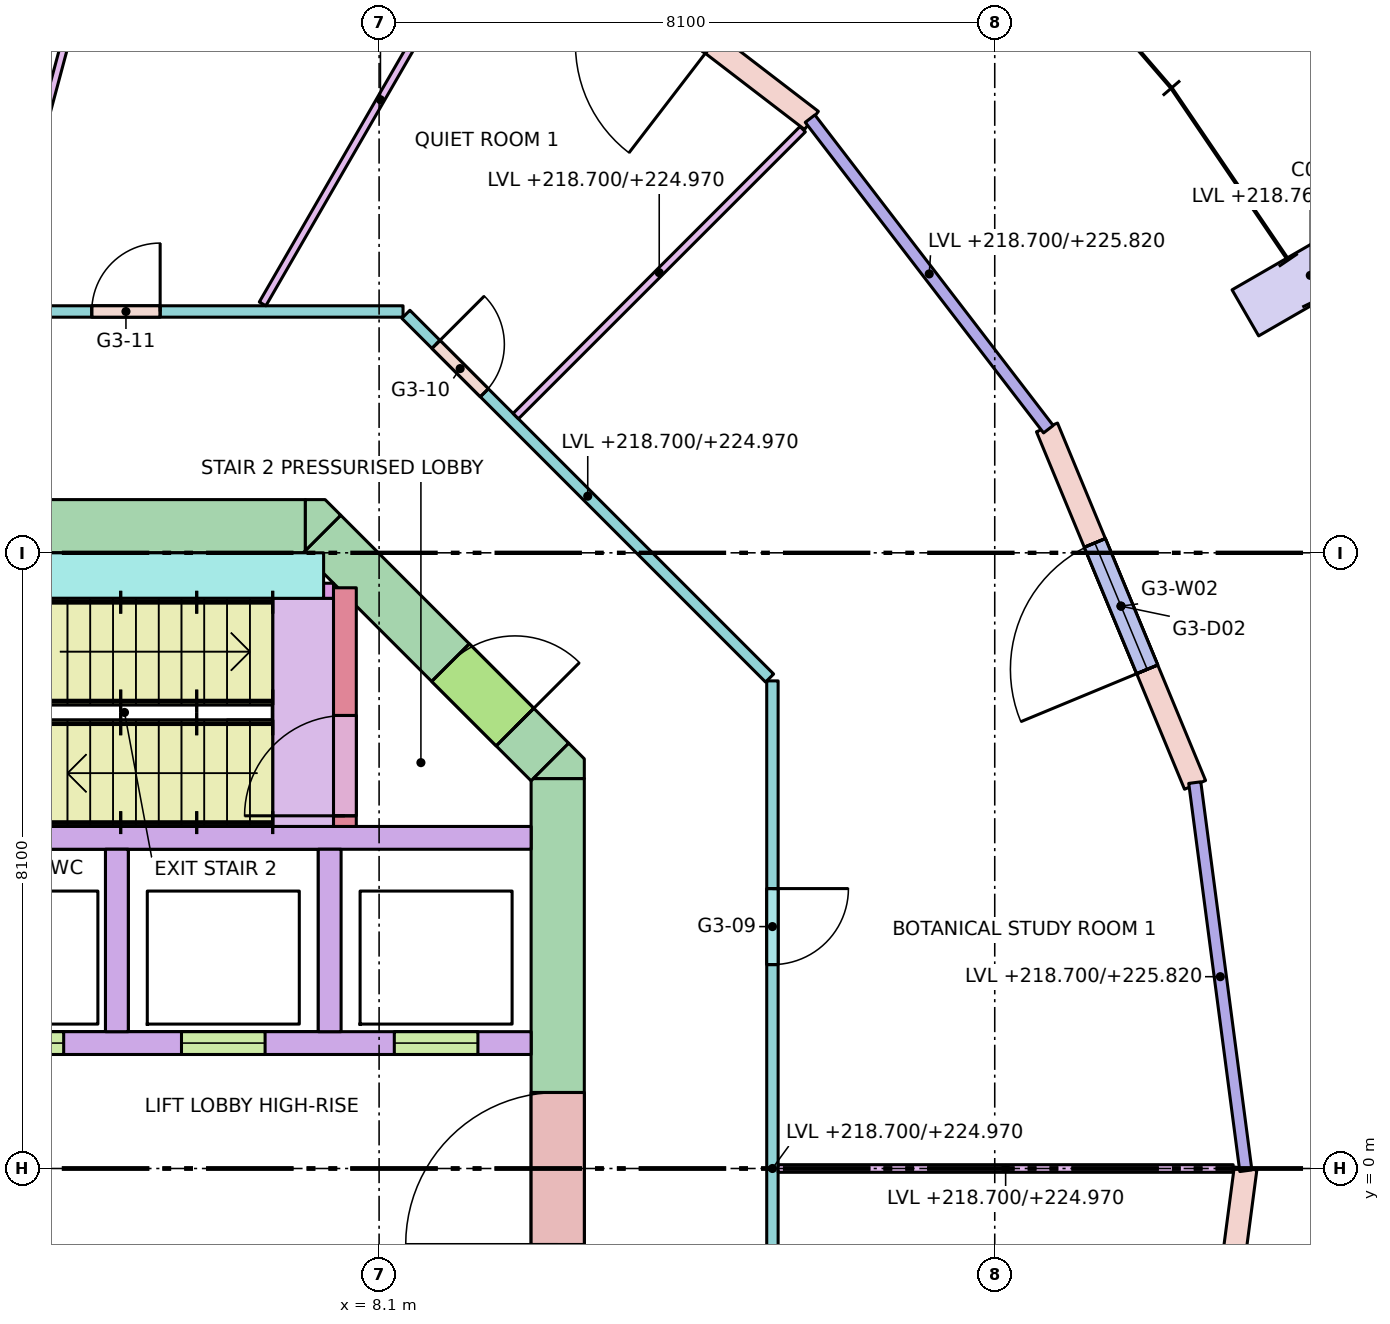
"""IFC4 building model, lengths in metres.
Left out: names, types, materials, properties, quantities, classifications, styles, units other than length and angle.
Written with IfcOpenShell. Run it as: python <this file> out.ifc"""

import sys

from ifc_helpers import new_model, si_unit, direction, frame, frame_2d, origin, origin_2d, place, context, subcontext, project, spatial, polyline, rectangle, outline, extrude, element, fill, save


model = new_model("IFC4")
c1 = context("Model", 3, precision=1e-05, world=origin(), true_north=direction((0.0, 1.0)))
c2 = subcontext(c1, "Body", "Model", "MODEL_VIEW")
j1 = project(units=[si_unit("LENGTHUNIT", "METRE"), si_unit("PLANEANGLEUNIT", "RADIAN")], contexts=[c1])
p1 = place(None, origin())
s1 = spatial("IfcSite", under=j1, at=p1, CompositionType="ELEMENT")
p2 = place(p1, origin())
s2 = spatial("IfcBuilding", under=s1, at=p2, CompositionType="ELEMENT")
p3 = place(p2, frame((0.0, 0.0, 218.7)))
s3 = spatial("IfcBuildingStorey", under=s2, at=p3, CompositionType="ELEMENT", Elevation=218.7)
p4 = place(p3, frame((19.927, 11.505, 0.067), z_axis=(0.115974555477, 0.066927607381, 0.990994751677), x_axis=(-0.499830087764, 0.866123480438, 0.0)))
e1 = element("IfcColumn", 1, at=p4, inside=s3, PredefinedType="COLUMN", context=c2, shape_type="SweptSolid", body=[
    extrude(rectangle(XDim=0.7, YDim=1.0, at=origin_2d()), origin(), (0.0, 0.0, 1.0), 7.332),
])
p5 = place(p3, frame((-7.13, 8.45, -0.28), z_axis=(0.0, 0.0, 1.0), x_axis=(1.0, 0.0, 0.0)))
e2 = element("IfcWall", 2, at=p5, inside=s3, PredefinedType="SHEAR", context=c2, shape_type="SweptSolid", body=[
    extrude(rectangle(XDim=14.26, YDim=0.7, at=frame_2d((7.13, 0.0))), origin(), (0.0, 0.0, 1.0), 7.4),
])
p6 = place(p5, frame((5.48, 0.0, 0.28)))
e3 = element("IfcOpeningElement", 3, at=p6, cuts=e2, PredefinedType="OPENING", context=c2, shape_type="SweptSolid", body=[
    extrude(rectangle(XDim=0.7, YDim=2.1, at=frame_2d((0.35, 1.05))), frame((0.0, 0.36, 0.0), z_axis=(0.0, -1.0, 0.0), x_axis=(1.0, 0.0, 0.0)), (0.0, 0.0, 1.0), 0.72),
])
p7 = place(p5, frame((7.155, 0.0, 0.28)))
e4 = element("IfcOpeningElement", 4, at=p7, cuts=e2, PredefinedType="OPENING", context=c2, shape_type="SweptSolid", body=[
    extrude(rectangle(XDim=0.9, YDim=2.1, at=frame_2d((0.45, 1.05))), frame((0.0, 0.36, 0.0), z_axis=(0.0, -1.0, 0.0), x_axis=(1.0, 0.0, 0.0)), (0.0, 0.0, 1.0), 0.72),
])
p8 = place(p3, frame((10.45, -5.13, -0.28), z_axis=(0.0, 0.0, 1.0), x_axis=(0.0, 1.0, 0.0)))
e5 = element("IfcWall", 5, at=p8, inside=s3, PredefinedType="SHEAR", context=c2, shape_type="SweptSolid", body=[
    extrude(rectangle(XDim=10.26, YDim=0.7, at=frame_2d((5.13, 0.0))), origin(), (0.0, 0.0, 1.0), 7.4),
])
p9 = place(p8, frame((4.13, 0.0, 0.28)))
e6 = element("IfcOpeningElement", 6, at=p9, cuts=e5, PredefinedType="OPENING", context=c2, shape_type="SweptSolid", body=[
    extrude(rectangle(XDim=2.0, YDim=2.1, at=frame_2d((1.0, 1.05))), frame((0.0, 0.36, 0.0), z_axis=(0.0, -1.0, 0.0), x_axis=(1.0, 0.0, 0.0)), (0.0, 0.0, 1.0), 0.72),
])
p10 = place(p3, frame((7.347, 8.347, -0.28), z_axis=(0.0, 0.0, 1.0), x_axis=(0.707106781187, -0.707106781187, 0.0)))
e7 = element("IfcWall", 7, at=p10, inside=s3, PredefinedType="SHEAR", context=c2, shape_type="SweptSolid", body=[
    extrude(rectangle(XDim=4.243, YDim=0.7, at=frame_2d((2.121, 0.0))), origin(), (0.0, 0.0, 1.0), 7.4),
])
p11 = place(p10, frame((2.393, 0.0, 0.28)))
e8 = element("IfcOpeningElement", 8, at=p11, cuts=e7, PredefinedType="OPENING", context=c2, shape_type="SweptSolid", body=[
    extrude(rectangle(XDim=1.2, YDim=2.1, at=frame_2d((0.6, 1.05))), frame((0.0, 0.36, 0.0), z_axis=(0.0, -1.0, 0.0), x_axis=(1.0, 0.0, 0.0)), (0.0, 0.0, 1.0), 0.72),
])
p12 = place(p3, frame((0.0, 0.0, -0.28)))
e9 = element("IfcWall", 9, at=p12, inside=s3, PredefinedType="SHEAR", context=c2, shape_type="SweptSolid", body=[
    extrude(outline(polyline([(10.8, 5.39), (10.8, 5.13), (10.8, 5.13), (10.13, 5.13), (10.595, 5.595), (10.595, 5.595), (10.595, 5.595), (10.8, 5.39)])), origin(), (0.0, 0.0, 1.0), 7.4),
])
p13 = place(p3, frame((0.0, 0.0, -0.28)))
e10 = element("IfcWall", 10, at=p13, inside=s3, PredefinedType="SHEAR", context=c2, shape_type="SweptSolid", body=[
    extrude(outline(polyline([(7.39, 8.8), (7.595, 8.595), (7.595, 8.595), (7.595, 8.595), (7.13, 8.13), (7.13, 8.8), (7.13, 8.8), (7.39, 8.8)])), origin(), (0.0, 0.0, 1.0), 7.4),
])
p14 = place(p3, frame((2.0, 4.35, 0.0), z_axis=(0.0, 0.0, 1.0), x_axis=(1.0, 0.0, 0.0)))
e11 = element("IfcWall", 11, at=p14, inside=s3, PredefinedType="SOLIDWALL", context=c2, shape_type="SweptSolid", body=[
    extrude(rectangle(XDim=8.1, YDim=0.3, at=frame_2d((4.05, 0.0))), origin(), (0.0, 0.0, 1.0), 7.12),
])
p15 = place(p3, frame((2.0, 1.65, 0.0), z_axis=(0.0, 0.0, 1.0), x_axis=(1.0, 0.0, 0.0)))
e12 = element("IfcWall", 12, at=p15, inside=s3, PredefinedType="SOLIDWALL", context=c2, shape_type="SweptSolid", body=[
    extrude(rectangle(XDim=8.1, YDim=0.3, at=frame_2d((4.05, 0.0))), origin(), (0.0, 0.0, 1.0), 7.12),
])
p16 = place(p15, frame((0.85, 0.0, 0.0)))
e13 = element("IfcOpeningElement", 13, at=p16, cuts=e12, PredefinedType="OPENING", context=c2, shape_type="SweptSolid", body=[
    extrude(rectangle(XDim=1.1, YDim=2.1, at=frame_2d((0.55, 1.05))), frame((0.0, 0.16, 0.0), z_axis=(0.0, -1.0, 0.0), x_axis=(1.0, 0.0, 0.0)), (0.0, 0.0, 1.0), 0.32),
])
p17 = place(p15, frame((3.5, 0.0, 0.0)))
e14 = element("IfcOpeningElement", 14, at=p17, cuts=e12, PredefinedType="OPENING", context=c2, shape_type="SweptSolid", body=[
    extrude(rectangle(XDim=1.1, YDim=2.1, at=frame_2d((0.55, 1.05))), frame((0.0, 0.16, 0.0), z_axis=(0.0, -1.0, 0.0), x_axis=(1.0, 0.0, 0.0)), (0.0, 0.0, 1.0), 0.32),
])
p18 = place(p15, frame((6.3, 0.0, 0.0)))
e15 = element("IfcOpeningElement", 15, at=p18, cuts=e12, PredefinedType="OPENING", context=c2, shape_type="SweptSolid", body=[
    extrude(rectangle(XDim=1.1, YDim=2.1, at=frame_2d((0.55, 1.05))), frame((0.0, 0.16, 0.0), z_axis=(0.0, -1.0, 0.0), x_axis=(1.0, 0.0, 0.0)), (0.0, 0.0, 1.0), 0.32),
])
for number, where, z_axis, x_axis in (
    (16, (4.65, 1.8, 0.0), (0.0, 0.0, 1.0), (0.0, 1.0, 0.0)),
    (17, (7.45, 1.8, 0.0), (0.0, 0.0, 1.0), (0.0, 1.0, 0.0)),
):
    element("IfcWall", number, at=place(p3, frame(where, z_axis=z_axis, x_axis=x_axis)), inside=s3, PredefinedType="SOLIDWALL", context=c2, shape_type="SweptSolid", body=[
        extrude(rectangle(XDim=2.4, YDim=0.3, at=frame_2d((1.2, 0.0))), origin(), (0.0, 0.0, 1.0), 7.12),
    ])
p19 = place(p3, frame((7.65, 4.5, 0.0), z_axis=(0.0, 0.0, 1.0), x_axis=(0.0, 1.0, 0.0)))
e18 = element("IfcWall", 18, at=p19, inside=s3, PredefinedType="SHEAR", context=c2, shape_type="SweptSolid", body=[
    extrude(rectangle(XDim=3.14, YDim=0.3, at=frame_2d((1.57, 0.0))), origin(), (0.0, 0.0, 1.0), 7.12),
])
p20 = place(p19, frame((0.14, 0.0, 0.0)))
e19 = element("IfcOpeningElement", 19, at=p20, cuts=e18, PredefinedType="OPENING", context=c2, shape_type="SweptSolid", body=[
    extrude(rectangle(XDim=1.32, YDim=2.1, at=frame_2d((0.66, 1.05))), frame((0.0, 0.16, 0.0), z_axis=(0.0, -1.0, 0.0), x_axis=(1.0, 0.0, 0.0)), (0.0, 0.0, 1.0), 0.32),
])
p21 = place(p3, frame((2.0, 7.8, 0.0), z_axis=(0.0, 0.0, 1.0), x_axis=(1.0, 0.0, 0.0)))
e20 = element("IfcWall", 20, at=p21, inside=s3, PredefinedType="SHEAR", context=c2, shape_type="SweptSolid", body=[
    extrude(rectangle(XDim=5.37, YDim=0.6, at=frame_2d((2.685, 0.0))), origin(), (0.0, 0.0, 1.0), 7.12),
])
p22 = place(p3, frame((6.9, 7.6, 0.0), z_axis=(0.0, 0.0, 1.0), x_axis=(1.0, 0.0, 0.0)))
e21 = element("IfcWall", 21, at=p22, inside=s3, PredefinedType="SHEAR", context=c2, shape_type="SweptSolid", body=[
    extrude(rectangle(XDim=0.6, YDim=0.2, at=frame_2d((0.3, 0.0))), origin(), (0.0, 0.0, 1.0), 7.12),
])
p23 = place(p3, frame((18.836, 5.047, 0.0), z_axis=(0.0, 0.0, 1.0), x_axis=(-0.382724538613, 0.923862504675, 0.0)))
e22 = element("IfcWall", 22, at=p23, inside=s3, PredefinedType="STANDARD", context=c2, shape_type="SweptSolid", body=[
    extrude(rectangle(XDim=5.091, YDim=0.3, at=frame_2d((2.545, 0.0))), origin(), (0.0, 0.0, 1.0), 7.12),
])
p24 = place(p23, frame((1.645, 0.0, 0.0)))
e23 = element("IfcOpeningElement", 23, at=p24, cuts=e22, PredefinedType="OPENING", context=c2, shape_type="SweptSolid", body=[
    extrude(rectangle(XDim=1.8, YDim=2.4, at=frame_2d((0.9, 1.2))), frame((0.0, 0.16, 0.0), z_axis=(0.0, -1.0, 0.0), x_axis=(1.0, 0.0, 0.0)), (0.0, 0.0, 1.0), 0.32),
])
p25 = place(p23, frame((1.645, 0.0, 2.8)))
e24 = element("IfcOpeningElement", 24, at=p25, cuts=e22, PredefinedType="OPENING", context=c2, shape_type="SweptSolid", body=[
    extrude(rectangle(XDim=1.8, YDim=4.1, at=frame_2d((0.9, 2.05))), frame((0.0, 0.16, 0.0), z_axis=(0.0, -1.0, 0.0), x_axis=(1.0, 0.0, 0.0)), (0.0, 0.0, 1.0), 0.32),
])
p26 = place(p3, frame((13.789, 13.789, 0.0), z_axis=(0.0, 0.0, 1.0), x_axis=(-0.79335619014, 0.608757714995, 0.0)))
e25 = element("IfcWall", 25, at=p26, inside=s3, PredefinedType="STANDARD", context=c2, shape_type="SweptSolid", body=[
    extrude(rectangle(XDim=5.091, YDim=0.3, at=frame_2d((2.545, 0.0))), origin(), (0.0, 0.0, 1.0), 7.12),
])
p27 = place(p26, frame((1.645, 0.0, 0.0)))
e26 = element("IfcOpeningElement", 26, at=p27, cuts=e25, PredefinedType="OPENING", context=c2, shape_type="SweptSolid", body=[
    extrude(rectangle(XDim=1.8, YDim=2.4, at=frame_2d((0.9, 1.2))), frame((0.0, 0.16, 0.0), z_axis=(0.0, -1.0, 0.0), x_axis=(1.0, 0.0, 0.0)), (0.0, 0.0, 1.0), 0.32),
])
p28 = place(p26, frame((1.645, 0.0, 2.8)))
e27 = element("IfcOpeningElement", 27, at=p28, cuts=e25, PredefinedType="OPENING", context=c2, shape_type="SweptSolid", body=[
    extrude(rectangle(XDim=1.8, YDim=4.1, at=frame_2d((0.9, 2.05))), frame((0.0, 0.16, 0.0), z_axis=(0.0, -1.0, 0.0), x_axis=(1.0, 0.0, 0.0)), (0.0, 0.0, 1.0), 0.32),
])
p29 = place(p3, frame((18.836, -5.047, 0.0), z_axis=(0.0, 0.0, 1.0), x_axis=(0.130495451964, 0.99144890792, 0.0)))
e28 = element("IfcWall", 28, at=p29, inside=s3, PredefinedType="STANDARD", context=c2, shape_type="SweptSolid", body=[
    extrude(rectangle(XDim=5.091, YDim=0.3, at=frame_2d((2.545, 0.0))), origin(), (0.0, 0.0, 1.0), 7.12),
])
p30 = place(p29, frame((1.645, 0.0, 0.0)))
e29 = element("IfcOpeningElement", 29, at=p30, cuts=e28, PredefinedType="OPENING", context=c2, shape_type="SweptSolid", body=[
    extrude(rectangle(XDim=1.8, YDim=2.4, at=frame_2d((0.9, 1.2))), frame((0.0, 0.16, 0.0), z_axis=(0.0, -1.0, 0.0), x_axis=(1.0, 0.0, 0.0)), (0.0, 0.0, 1.0), 0.32),
])
p31 = place(p29, frame((1.645, 0.0, 2.8)))
e30 = element("IfcOpeningElement", 30, at=p31, cuts=e28, PredefinedType="OPENING", context=c2, shape_type="SweptSolid", body=[
    extrude(rectangle(XDim=1.8, YDim=4.1, at=frame_2d((0.9, 2.05))), frame((0.0, 0.16, 0.0), z_axis=(0.0, -1.0, 0.0), x_axis=(1.0, 0.0, 0.0)), (0.0, 0.0, 1.0), 0.32),
])
p32 = place(p3, frame((-8.415, 11.275, 0.0), z_axis=(0.0, 0.0, 1.0), x_axis=(1.0, 0.0, 0.0)))
e31 = element("IfcWall", 31, at=p32, inside=s3, PredefinedType="PARTITIONING", context=c2, shape_type="SweptSolid", body=[
    extrude(rectangle(XDim=16.83, YDim=0.15, at=frame_2d((8.415, 0.0))), origin(), (0.0, 0.0, 1.0), 6.27),
])
p33 = place(p32, frame((4.256, 0.0, 0.0)))
e32 = element("IfcOpeningElement", 32, at=p33, cuts=e31, PredefinedType="OPENING", context=c2, shape_type="SweptSolid", body=[
    extrude(rectangle(XDim=1.8, YDim=2.1, at=frame_2d((0.9, 1.05))), frame((0.0, 0.085, 0.0), z_axis=(0.0, -1.0, 0.0), x_axis=(1.0, 0.0, 0.0)), (0.0, 0.0, 1.0), 0.17),
])
p34 = place(p32, frame((12.734, 0.0, 0.0)))
e33 = element("IfcOpeningElement", 33, at=p34, cuts=e31, PredefinedType="OPENING", context=c2, shape_type="SweptSolid", body=[
    extrude(rectangle(XDim=0.9, YDim=2.1, at=frame_2d((0.45, 1.05))), frame((0.0, 0.085, 0.0), z_axis=(0.0, -1.0, 0.0), x_axis=(1.0, 0.0, 0.0)), (0.0, 0.0, 1.0), 0.17),
])
p35 = place(p32, frame((9.477, 0.0, 0.0)))
e34 = element("IfcOpeningElement", 34, at=p35, cuts=e31, PredefinedType="OPENING", context=c2, shape_type="SweptSolid", body=[
    extrude(rectangle(XDim=0.9, YDim=2.1, at=frame_2d((0.45, 1.05))), frame((0.0, 0.085, 0.0), z_axis=(0.0, -1.0, 0.0), x_axis=(1.0, 0.0, 0.0)), (0.0, 0.0, 1.0), 0.17),
])
p36 = place(p3, frame((8.452, 11.238, 0.0), z_axis=(0.0, 0.0, 1.0), x_axis=(0.707106781187, -0.707106781187, 0.0)))
e35 = element("IfcWall", 35, at=p36, inside=s3, PredefinedType="PARTITIONING", context=c2, shape_type="SweptSolid", body=[
    extrude(rectangle(XDim=6.768, YDim=0.15, at=frame_2d((3.384, 0.0))), origin(), (0.0, 0.0, 1.0), 6.27),
])
p37 = place(p36, frame((0.56, 0.0, 0.0)))
e36 = element("IfcOpeningElement", 36, at=p37, cuts=e35, PredefinedType="OPENING", context=c2, shape_type="SweptSolid", body=[
    extrude(rectangle(XDim=0.9, YDim=2.1, at=frame_2d((0.45, 1.05))), frame((0.0, 0.085, 0.0), z_axis=(0.0, -1.0, 0.0), x_axis=(1.0, 0.0, 0.0)), (0.0, 0.0, 1.0), 0.17),
])
p38 = place(p3, frame((13.275, 6.415, 0.0), z_axis=(0.0, 0.0, 1.0), x_axis=(0.0, -1.0, 0.0)))
e37 = element("IfcWall", 37, at=p38, inside=s3, PredefinedType="PARTITIONING", context=c2, shape_type="SweptSolid", body=[
    extrude(rectangle(XDim=12.83, YDim=0.15, at=frame_2d((6.415, 0.0))), origin(), (0.0, 0.0, 1.0), 6.27),
])
p39 = place(p38, frame((9.098, 0.0, 0.0)))
e38 = element("IfcOpeningElement", 38, at=p39, cuts=e37, PredefinedType="OPENING", context=c2, shape_type="SweptSolid", body=[
    extrude(rectangle(XDim=1.0, YDim=2.1, at=frame_2d((0.5, 1.05))), frame((0.0, 0.085, 0.0), z_axis=(0.0, -1.0, 0.0), x_axis=(1.0, 0.0, 0.0)), (0.0, 0.0, 1.0), 0.17),
])
p40 = place(p38, frame((2.733, 0.0, 0.0)))
e39 = element("IfcOpeningElement", 39, at=p40, cuts=e37, PredefinedType="OPENING", context=c2, shape_type="SweptSolid", body=[
    extrude(rectangle(XDim=1.0, YDim=2.1, at=frame_2d((0.5, 1.05))), frame((0.0, 0.085, 0.0), z_axis=(0.0, -1.0, 0.0), x_axis=(1.0, 0.0, 0.0)), (0.0, 0.0, 1.0), 0.17),
])
p41 = place(p3, frame((13.35, 0.0, 0.0), z_axis=(0.0, 0.0, 1.0), x_axis=(1.0, 0.0, 0.0)))
e40 = element("IfcWall", 40, at=p41, inside=s3, PredefinedType="PARTITIONING", context=c2, shape_type="SweptSolid", body=[
    extrude(rectangle(XDim=5.987, YDim=0.1, at=frame_2d((2.993, 0.0))), origin(), (0.0, 0.0, 1.0), 6.27),
])
p42 = place(p3, frame((9.898, 9.898, 0.0), z_axis=(0.0, 0.0, 1.0), x_axis=(0.707106781187, 0.707106781187, 0.0)))
e41 = element("IfcWall", 41, at=p42, inside=s3, PredefinedType="PARTITIONING", context=c2, shape_type="SweptSolid", body=[
    extrude(rectangle(XDim=5.339, YDim=0.1, at=frame_2d((2.669, 0.0))), origin(), (0.0, 0.0, 1.0), 6.27),
])
p43 = place(p3, frame((6.567, 11.375, 0.0), z_axis=(0.0, 0.0, 1.0), x_axis=(0.500004114527, 0.866023028248, 0.0)))
e42 = element("IfcWall", 42, at=p43, inside=s3, PredefinedType="PARTITIONING", context=c2, shape_type="SweptSolid", body=[
    extrude(rectangle(XDim=6.203, YDim=0.1, at=frame_2d((3.101, 0.0))), origin(), (0.0, 0.0, 1.0), 6.27),
])
p44 = place(p3, frame((3.045, 11.364, 0.0), z_axis=(0.0, 0.0, 1.0), x_axis=(0.25879840648, 0.965931356155, 0.0)))
e43 = element("IfcWall", 43, at=p44, inside=s3, PredefinedType="PARTITIONING", context=c2, shape_type="SweptSolid", body=[
    extrude(rectangle(XDim=7.572, YDim=0.1, at=frame_2d((3.786, 0.0))), origin(), (0.0, 0.0, 1.0), 6.27),
])
p45 = place(p24, origin())
e44 = element("IfcDoor", 44, at=p45, inside=s3, OperationType="SINGLE_SWING_LEFT", PredefinedType="DOOR", context=c2, shape_type="SweptSolid", body=[
    extrude(rectangle(XDim=1.8, YDim=2.4, at=frame_2d((0.9, 1.2))), frame((0.0, 0.025, 0.0), z_axis=(0.0, -1.0, 0.0), x_axis=(1.0, 0.0, 0.0)), (0.0, 0.0, 1.0), 0.05),
])
fill(e23, e44)
p46 = place(p25, origin())
e45 = element("IfcWindow", 45, at=p46, inside=s3, PartitioningType="SINGLE_PANEL", PredefinedType="WINDOW", context=c2, shape_type="SweptSolid", body=[
    extrude(rectangle(XDim=1.8, YDim=4.1, at=frame_2d((0.9, 2.05))), frame((0.0, 0.03, 0.0), z_axis=(0.0, -1.0, 0.0), x_axis=(1.0, 0.0, 0.0)), (0.0, 0.0, 1.0), 0.06),
])
fill(e24, e45)
p47 = place(p16, origin())
e46 = element("IfcDoor", 46, at=p47, inside=s3, OperationType="DOUBLE_DOOR_SLIDING", PredefinedType="DOOR", context=c2, shape_type="SweptSolid", body=[
    extrude(rectangle(XDim=1.1, YDim=2.1, at=frame_2d((0.55, 1.05))), frame((0.0, 0.025, 0.0), z_axis=(0.0, -1.0, 0.0), x_axis=(1.0, 0.0, 0.0)), (0.0, 0.0, 1.0), 0.05),
])
fill(e13, e46)
p48 = place(p17, origin())
e47 = element("IfcDoor", 47, at=p48, inside=s3, OperationType="DOUBLE_DOOR_SLIDING", PredefinedType="DOOR", context=c2, shape_type="SweptSolid", body=[
    extrude(rectangle(XDim=1.1, YDim=2.1, at=frame_2d((0.55, 1.05))), frame((0.0, 0.025, 0.0), z_axis=(0.0, -1.0, 0.0), x_axis=(1.0, 0.0, 0.0)), (0.0, 0.0, 1.0), 0.05),
])
fill(e14, e47)
p49 = place(p18, origin())
e48 = element("IfcDoor", 48, at=p49, inside=s3, OperationType="DOUBLE_DOOR_SLIDING", PredefinedType="DOOR", context=c2, shape_type="SweptSolid", body=[
    extrude(rectangle(XDim=1.1, YDim=2.1, at=frame_2d((0.55, 1.05))), frame((0.0, 0.025, 0.0), z_axis=(0.0, -1.0, 0.0), x_axis=(1.0, 0.0, 0.0)), (0.0, 0.0, 1.0), 0.05),
])
fill(e15, e48)
p50 = place(p20, origin())
e49 = element("IfcDoor", 49, at=p50, inside=s3, OperationType="DOUBLE_DOOR_SINGLE_SWING", PredefinedType="DOOR", context=c2, shape_type="SweptSolid", body=[
    extrude(rectangle(XDim=1.32, YDim=2.1, at=frame_2d((0.66, 1.05))), frame((0.0, 0.025, 0.0), z_axis=(0.0, -1.0, 0.0), x_axis=(1.0, 0.0, 0.0)), (0.0, 0.0, 1.0), 0.05),
])
fill(e19, e49)
p51 = place(p11, origin())
e50 = element("IfcDoor", 50, at=p51, inside=s3, OperationType="SINGLE_SWING_RIGHT", PredefinedType="DOOR", context=c2, shape_type="SweptSolid", body=[
    extrude(rectangle(XDim=1.2, YDim=2.1, at=frame_2d((0.6, 1.05))), frame((0.0, 0.025, 0.0), z_axis=(0.0, -1.0, 0.0), x_axis=(1.0, 0.0, 0.0)), (0.0, 0.0, 1.0), 0.05),
])
fill(e8, e50)
p52 = place(p9, origin())
e51 = element("IfcDoor", 51, at=p52, inside=s3, OperationType="DOUBLE_DOOR_SINGLE_SWING", PredefinedType="DOOR", context=c2, shape_type="SweptSolid", body=[
    extrude(rectangle(XDim=2.0, YDim=2.1, at=frame_2d((1.0, 1.05))), frame((0.0, 0.025, 0.0), z_axis=(0.0, -1.0, 0.0), x_axis=(1.0, 0.0, 0.0)), (0.0, 0.0, 1.0), 0.05),
])
fill(e6, e51)
p53 = place(p40, origin())
e52 = element("IfcDoor", 52, at=p53, inside=s3, OperationType="SINGLE_SWING_LEFT", PredefinedType="DOOR", context=c2, shape_type="SweptSolid", body=[
    extrude(rectangle(XDim=1.0, YDim=2.1, at=frame_2d((0.5, 1.05))), frame((0.0, 0.025, 0.0), z_axis=(0.0, -1.0, 0.0), x_axis=(1.0, 0.0, 0.0)), (0.0, 0.0, 1.0), 0.05),
])
fill(e39, e52)
p54 = place(p37, origin())
e53 = element("IfcDoor", 53, at=p54, inside=s3, OperationType="SINGLE_SWING_LEFT", PredefinedType="DOOR", context=c2, shape_type="SweptSolid", body=[
    extrude(rectangle(XDim=0.9, YDim=2.1, at=frame_2d((0.45, 1.05))), frame((0.0, 0.025, 0.0), z_axis=(0.0, -1.0, 0.0), x_axis=(1.0, 0.0, 0.0)), (0.0, 0.0, 1.0), 0.05),
])
fill(e36, e53)
p55 = place(p34, origin())
e54 = element("IfcDoor", 54, at=p55, inside=s3, OperationType="SINGLE_SWING_RIGHT", PredefinedType="DOOR", context=c2, shape_type="SweptSolid", body=[
    extrude(rectangle(XDim=0.9, YDim=2.1, at=frame_2d((0.45, 1.05))), frame((0.0, 0.025, 0.0), z_axis=(0.0, -1.0, 0.0), x_axis=(1.0, 0.0, 0.0)), (0.0, 0.0, 1.0), 0.05),
])
fill(e33, e54)
save(model, sys.argv[1])
